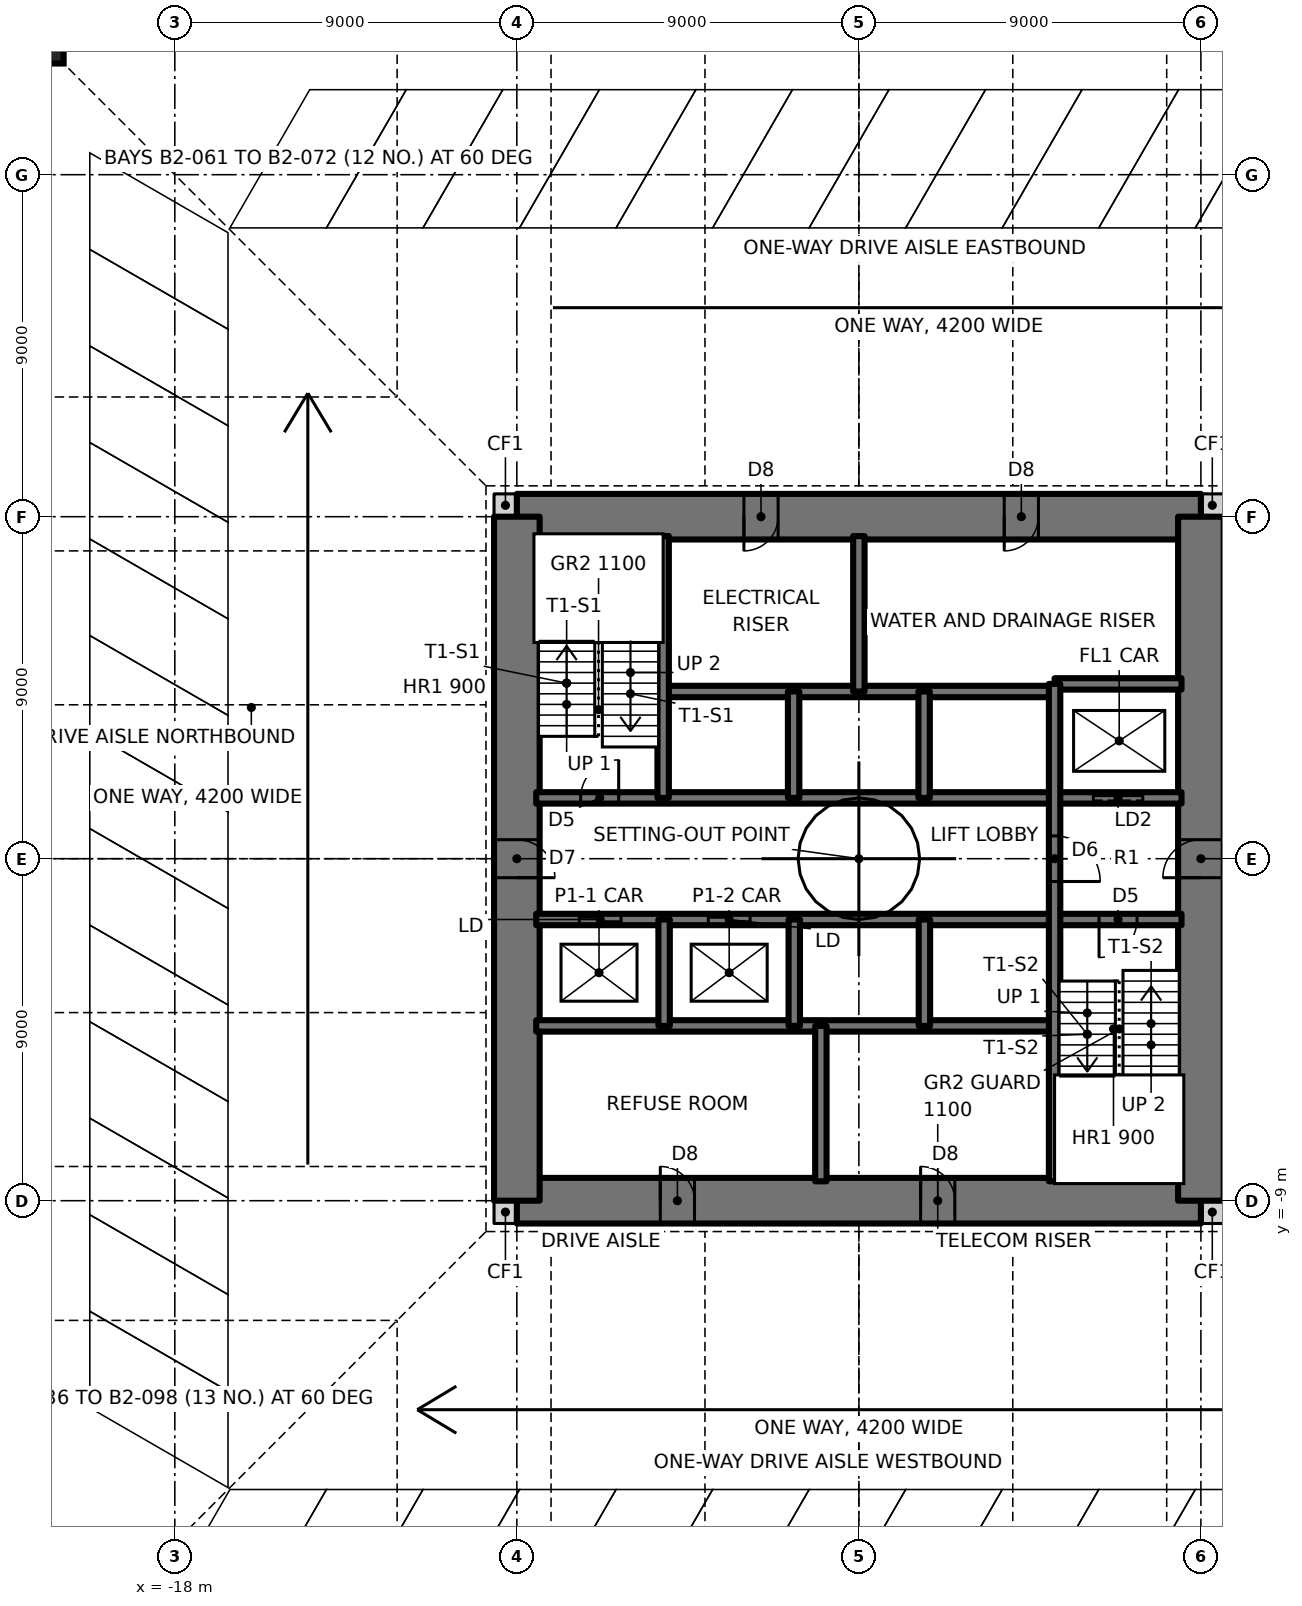
"""IFC4 building model, lengths in metres.
Left out: names, types, materials, properties, quantities, classifications, styles, units other than length and angle.
Written with IfcOpenShell. Run it as: python <this file> out.ifc"""

import sys

from ifc_helpers import new_model, si_unit, direction, frame, frame_2d, origin, origin_2d, place, context, subcontext, project, spatial, rectangle, hollow_rectangle, extrude, element, fill, save


model = new_model("IFC4")
c1 = context("Model", 3, precision=1e-05, world=origin(), true_north=direction((0.0, 1.0)))
c2 = subcontext(c1, "Body", "Model", "MODEL_VIEW")
j1 = project(units=[si_unit("LENGTHUNIT", "METRE"), si_unit("PLANEANGLEUNIT", "RADIAN")], contexts=[c1])
p1 = place(None, origin())
s1 = spatial("IfcSite", under=j1, at=p1, CompositionType="ELEMENT")
p2 = place(p1, origin())
s2 = spatial("IfcBuilding", under=s1, at=p2, CompositionType="ELEMENT")
p3 = place(p2, frame((0.0, 0.0, -7.2)))
s3 = spatial("IfcBuildingStorey", under=s2, at=p3, CompositionType="ELEMENT", Elevation=-7.2)
p4 = place(p3, frame((-21.326, 21.326, -1.8), z_axis=(0.0, 0.0, 1.0), x_axis=(1.0, 0.0, 0.0)))
e1 = element("IfcColumn", 1, at=p4, inside=s3, PredefinedType="COLUMN", context=c2, shape_type="SweptSolid", body=[
    extrude(hollow_rectangle(XDim=0.8, YDim=0.8, WallThickness=0.09, at=origin_2d()), origin(), (0.0, 0.0, 1.0), 5.4),
])
for number, where, z_axis, x_axis in (
    (2, (-9.6, -9.3, -1.8), (0.0, 0.0, 1.0), (1.0, 0.0, 0.0)),
    (3, (9.0, -9.3, -1.8), (0.0, 0.0, 1.0), (1.0, 0.0, 0.0)),
    (4, (9.0, 9.3, -1.8), (0.0, 0.0, 1.0), (1.0, 0.0, 0.0)),
    (5, (-9.6, 9.3, -1.8), (0.0, 0.0, 1.0), (1.0, 0.0, 0.0)),
):
    element("IfcWall", number, at=place(p3, frame(where, z_axis=z_axis, x_axis=x_axis)), inside=s3, PredefinedType="SOLIDWALL", context=c2, shape_type="SweptSolid", body=[
        extrude(rectangle(XDim=0.6, YDim=0.6, at=frame_2d((0.3, 0.0))), origin(), (0.0, 0.0, 1.0), 5.4),
    ])
p5 = place(p3, frame((-9.0, -9.0, -1.8), z_axis=(0.0, 0.0, 1.0), x_axis=(1.0, 0.0, 0.0)))
e6 = element("IfcWall", 6, at=p5, inside=s3, PredefinedType="SHEAR", context=c2, shape_type="SweptSolid", body=[
    extrude(rectangle(XDim=18.0, YDim=1.2, at=frame_2d((9.0, 0.0))), origin(), (0.0, 0.0, 1.0), 5.4),
])
p6 = place(p5, frame((3.775, 0.0, 1.8)))
e7 = element("IfcOpeningElement", 7, at=p6, cuts=e6, PredefinedType="OPENING", context=c2, shape_type="SweptSolid", body=[
    extrude(rectangle(XDim=0.9, YDim=2.1, at=frame_2d((0.45, 1.05))), frame((0.0, 0.61, 0.0), z_axis=(0.0, -1.0, 0.0), x_axis=(1.0, 0.0, 0.0)), (0.0, 0.0, 1.0), 1.22),
])
p7 = place(p5, frame((10.625, 0.0, 1.8)))
e8 = element("IfcOpeningElement", 8, at=p7, cuts=e6, PredefinedType="OPENING", context=c2, shape_type="SweptSolid", body=[
    extrude(rectangle(XDim=0.9, YDim=2.1, at=frame_2d((0.45, 1.05))), frame((0.0, 0.61, 0.0), z_axis=(0.0, -1.0, 0.0), x_axis=(1.0, 0.0, 0.0)), (0.0, 0.0, 1.0), 1.22),
])
p8 = place(p3, frame((9.0, 9.0, -1.8), z_axis=(0.0, 0.0, 1.0), x_axis=(-1.0, 0.0, 0.0)))
e9 = element("IfcWall", 9, at=p8, inside=s3, PredefinedType="SHEAR", context=c2, shape_type="SweptSolid", body=[
    extrude(rectangle(XDim=18.0, YDim=1.2, at=frame_2d((9.0, 0.0))), origin(), (0.0, 0.0, 1.0), 5.4),
])
p9 = place(p8, frame((11.125, 0.0, 1.8)))
e10 = element("IfcOpeningElement", 10, at=p9, cuts=e9, PredefinedType="OPENING", context=c2, shape_type="SweptSolid", body=[
    extrude(rectangle(XDim=0.9, YDim=2.1, at=frame_2d((0.45, 1.05))), frame((0.0, 0.61, 0.0), z_axis=(0.0, -1.0, 0.0), x_axis=(1.0, 0.0, 0.0)), (0.0, 0.0, 1.0), 1.22),
])
p10 = place(p8, frame((4.275, 0.0, 1.8)))
e11 = element("IfcOpeningElement", 11, at=p10, cuts=e9, PredefinedType="OPENING", context=c2, shape_type="SweptSolid", body=[
    extrude(rectangle(XDim=0.9, YDim=2.1, at=frame_2d((0.45, 1.05))), frame((0.0, 0.61, 0.0), z_axis=(0.0, -1.0, 0.0), x_axis=(1.0, 0.0, 0.0)), (0.0, 0.0, 1.0), 1.22),
])
p11 = place(p3, frame((9.0, -9.0, -1.8), z_axis=(0.0, 0.0, 1.0), x_axis=(0.0, 1.0, 0.0)))
e12 = element("IfcWall", 12, at=p11, inside=s3, PredefinedType="SHEAR", context=c2, shape_type="SweptSolid", body=[
    extrude(rectangle(XDim=18.0, YDim=1.2, at=frame_2d((9.0, 0.0))), origin(), (0.0, 0.0, 1.0), 5.4),
])
p12 = place(p11, frame((8.5, 0.0, 1.8)))
e13 = element("IfcOpeningElement", 13, at=p12, cuts=e12, PredefinedType="OPENING", context=c2, shape_type="SweptSolid", body=[
    extrude(rectangle(XDim=1.0, YDim=2.1, at=frame_2d((0.5, 1.05))), frame((0.0, 0.61, 0.0), z_axis=(0.0, -1.0, 0.0), x_axis=(1.0, 0.0, 0.0)), (0.0, 0.0, 1.0), 1.22),
])
p13 = place(p3, frame((-9.0, 9.0, -1.8), z_axis=(0.0, 0.0, 1.0), x_axis=(0.0, -1.0, 0.0)))
e14 = element("IfcWall", 14, at=p13, inside=s3, PredefinedType="SHEAR", context=c2, shape_type="SweptSolid", body=[
    extrude(rectangle(XDim=18.0, YDim=1.2, at=frame_2d((9.0, 0.0))), origin(), (0.0, 0.0, 1.0), 5.4),
])
p14 = place(p13, frame((8.5, 0.0, 1.8)))
e15 = element("IfcOpeningElement", 15, at=p14, cuts=e14, PredefinedType="OPENING", context=c2, shape_type="SweptSolid", body=[
    extrude(rectangle(XDim=1.0, YDim=2.1, at=frame_2d((0.5, 1.05))), frame((0.0, 0.61, 0.0), z_axis=(0.0, -1.0, 0.0), x_axis=(1.0, 0.0, 0.0)), (0.0, 0.0, 1.0), 1.22),
])
for number, where, z_axis, x_axis in (
    (16, (-29.55, -9.0, -1.8), (0.0, 0.0, 1.0), (1.0, 0.0, 0.0)),
    (17, (-29.55, 0.0, -1.8), (0.0, 0.0, 1.0), (1.0, 0.0, 0.0)),
    (18, (-29.55, 9.0, -1.8), (0.0, 0.0, 1.0), (1.0, 0.0, 0.0)),
):
    element("IfcWall", number, at=place(p3, frame(where, z_axis=z_axis, x_axis=x_axis)), inside=s3, PredefinedType="SOLIDWALL", context=c2, shape_type="SweptSolid", body=[
        extrude(rectangle(XDim=19.95, YDim=0.45, at=frame_2d((9.975, 0.0))), origin(), (0.0, 0.0, 1.0), 1.5),
    ])
p15 = place(p3, frame((-29.55, 18.0, -1.8), z_axis=(0.0, 0.0, 1.0), x_axis=(1.0, 0.0, 0.0)))
e19 = element("IfcWall", 19, at=p15, inside=s3, PredefinedType="SOLIDWALL", context=c2, shape_type="SweptSolid", body=[
    extrude(rectangle(XDim=59.1, YDim=0.45, at=frame_2d((29.55, 0.0))), origin(), (0.0, 0.0, 1.0), 1.5),
])
for number, where, z_axis, x_axis in (
    (20, (-18.0, -17.775, -1.8), (0.0, 0.0, 1.0), (0.0, 1.0, 0.0)),
    (21, (-18.0, -8.775, -1.8), (0.0, 0.0, 1.0), (0.0, 1.0, 0.0)),
    (22, (-18.0, 0.225, -1.8), (0.0, 0.0, 1.0), (0.0, 1.0, 0.0)),
    (23, (-18.0, 9.225, -1.8), (0.0, 0.0, 1.0), (0.0, 1.0, 0.0)),
    (24, (-18.0, 18.225, -1.8), (0.0, 0.0, 1.0), (0.0, 1.0, 0.0)),
):
    element("IfcWall", number, at=place(p3, frame(where, z_axis=z_axis, x_axis=x_axis)), inside=s3, PredefinedType="SOLIDWALL", context=c2, shape_type="SweptSolid", body=[
        extrude(rectangle(XDim=8.55, YDim=0.45, at=frame_2d((4.275, 0.0))), origin(), (0.0, 0.0, 1.0), 1.5),
    ])
for number, where, z_axis, x_axis in (
    (25, (-9.0, -17.775, -1.8), (0.0, 0.0, 1.0), (0.0, 1.0, 0.0)),
    (26, (-9.0, 9.6, -1.8), (0.0, 0.0, 1.0), (0.0, 1.0, 0.0)),
):
    element("IfcWall", number, at=place(p3, frame(where, z_axis=z_axis, x_axis=x_axis)), inside=s3, PredefinedType="SOLIDWALL", context=c2, shape_type="SweptSolid", body=[
        extrude(rectangle(XDim=8.175, YDim=0.45, at=frame_2d((4.087, 0.0))), origin(), (0.0, 0.0, 1.0), 1.5),
    ])
p16 = place(p3, frame((-9.0, 18.225, -1.8), z_axis=(0.0, 0.0, 1.0), x_axis=(0.0, 1.0, 0.0)))
e27 = element("IfcWall", 27, at=p16, inside=s3, PredefinedType="SOLIDWALL", context=c2, shape_type="SweptSolid", body=[
    extrude(rectangle(XDim=8.55, YDim=0.45, at=frame_2d((4.275, 0.0))), origin(), (0.0, 0.0, 1.0), 1.5),
])
for number, where, z_axis, x_axis in (
    (28, (0.0, -17.775, -1.8), (0.0, 0.0, 1.0), (0.0, 1.0, 0.0)),
    (29, (0.0, 9.6, -1.8), (0.0, 0.0, 1.0), (0.0, 1.0, 0.0)),
):
    element("IfcWall", number, at=place(p3, frame(where, z_axis=z_axis, x_axis=x_axis)), inside=s3, PredefinedType="SOLIDWALL", context=c2, shape_type="SweptSolid", body=[
        extrude(rectangle(XDim=8.175, YDim=0.45, at=frame_2d((4.087, 0.0))), origin(), (0.0, 0.0, 1.0), 1.5),
    ])
p17 = place(p3, frame((0.0, 18.225, -1.8), z_axis=(0.0, 0.0, 1.0), x_axis=(0.0, 1.0, 0.0)))
e30 = element("IfcWall", 30, at=p17, inside=s3, PredefinedType="SOLIDWALL", context=c2, shape_type="SweptSolid", body=[
    extrude(rectangle(XDim=8.55, YDim=0.45, at=frame_2d((4.275, 0.0))), origin(), (0.0, 0.0, 1.0), 1.5),
])
for number, where, z_axis, x_axis in (
    (31, (9.0, -17.775, -1.8), (0.0, 0.0, 1.0), (0.0, 1.0, 0.0)),
    (32, (9.0, 9.6, -1.8), (0.0, 0.0, 1.0), (0.0, 1.0, 0.0)),
):
    element("IfcWall", number, at=place(p3, frame(where, z_axis=z_axis, x_axis=x_axis)), inside=s3, PredefinedType="SOLIDWALL", context=c2, shape_type="SweptSolid", body=[
        extrude(rectangle(XDim=8.175, YDim=0.45, at=frame_2d((4.087, 0.0))), origin(), (0.0, 0.0, 1.0), 1.5),
    ])
p18 = place(p3, frame((9.0, 18.225, -1.8), z_axis=(0.0, 0.0, 1.0), x_axis=(0.0, 1.0, 0.0)))
e33 = element("IfcWall", 33, at=p18, inside=s3, PredefinedType="SOLIDWALL", context=c2, shape_type="SweptSolid", body=[
    extrude(rectangle(XDim=8.55, YDim=0.45, at=frame_2d((4.275, 0.0))), origin(), (0.0, 0.0, 1.0), 1.5),
])
p19 = place(p3, frame((-8.49, -4.4, -1.8), z_axis=(0.0, 0.0, 1.0), x_axis=(1.0, 0.0, 0.0)))
e34 = element("IfcWall", 34, at=p19, inside=s3, PredefinedType="SOLIDWALL", context=c2, shape_type="SweptSolid", body=[
    extrude(rectangle(XDim=13.64, YDim=0.3, at=frame_2d((6.82, 0.0))), origin(), (0.0, 0.0, 1.0), 5.4),
])
p20 = place(p3, frame((-8.49, -1.6, -1.8), z_axis=(0.0, 0.0, 1.0), x_axis=(1.0, 0.0, 0.0)))
e35 = element("IfcWall", 35, at=p20, inside=s3, PredefinedType="SOLIDWALL", context=c2, shape_type="SweptSolid", body=[
    extrude(rectangle(XDim=16.98, YDim=0.3, at=frame_2d((8.49, 0.0))), origin(), (0.0, 0.0, 1.0), 5.4),
])
p21 = place(p20, frame((14.81, 0.0, 1.8)))
e36 = element("IfcOpeningElement", 36, at=p21, cuts=e35, PredefinedType="OPENING", context=c2, shape_type="SweptSolid", body=[
    extrude(rectangle(XDim=1.0, YDim=2.1, at=frame_2d((0.5, 1.05))), frame((0.0, 0.16, 0.0), z_axis=(0.0, -1.0, 0.0), x_axis=(1.0, 0.0, 0.0)), (0.0, 0.0, 1.0), 0.32),
])
p22 = place(p20, frame((1.133, 0.0, 1.8)))
e37 = element("IfcOpeningElement", 37, at=p22, cuts=e35, PredefinedType="OPENING", context=c2, shape_type="SweptSolid", body=[
    extrude(rectangle(XDim=1.1, YDim=2.1, at=frame_2d((0.55, 1.05))), frame((0.0, 0.16, 0.0), z_axis=(0.0, -1.0, 0.0), x_axis=(1.0, 0.0, 0.0)), (0.0, 0.0, 1.0), 0.32),
])
p23 = place(p20, frame((4.528, 0.0, 1.8)))
e38 = element("IfcOpeningElement", 38, at=p23, cuts=e35, PredefinedType="OPENING", context=c2, shape_type="SweptSolid", body=[
    extrude(rectangle(XDim=1.1, YDim=2.1, at=frame_2d((0.55, 1.05))), frame((0.0, 0.16, 0.0), z_axis=(0.0, -1.0, 0.0), x_axis=(1.0, 0.0, 0.0)), (0.0, 0.0, 1.0), 0.32),
])
p24 = place(p3, frame((-8.49, 1.6, -1.8), z_axis=(0.0, 0.0, 1.0), x_axis=(1.0, 0.0, 0.0)))
e39 = element("IfcWall", 39, at=p24, inside=s3, PredefinedType="SOLIDWALL", context=c2, shape_type="SweptSolid", body=[
    extrude(rectangle(XDim=16.98, YDim=0.3, at=frame_2d((8.49, 0.0))), origin(), (0.0, 0.0, 1.0), 5.4),
])
p25 = place(p24, frame((1.17, 0.0, 1.8)))
e40 = element("IfcOpeningElement", 40, at=p25, cuts=e39, PredefinedType="OPENING", context=c2, shape_type="SweptSolid", body=[
    extrude(rectangle(XDim=1.0, YDim=2.1, at=frame_2d((0.5, 1.05))), frame((0.0, 0.16, 0.0), z_axis=(0.0, -1.0, 0.0), x_axis=(1.0, 0.0, 0.0)), (0.0, 0.0, 1.0), 0.32),
])
p26 = place(p24, frame((14.66, 0.0, 1.8)))
e41 = element("IfcOpeningElement", 41, at=p26, cuts=e39, PredefinedType="OPENING", context=c2, shape_type="SweptSolid", body=[
    extrude(rectangle(XDim=1.3, YDim=2.1, at=frame_2d((0.65, 1.05))), frame((0.0, 0.16, 0.0), z_axis=(0.0, -1.0, 0.0), x_axis=(1.0, 0.0, 0.0)), (0.0, 0.0, 1.0), 0.32),
])
p27 = place(p3, frame((-5.15, 4.4, -1.8), z_axis=(0.0, 0.0, 1.0), x_axis=(1.0, 0.0, 0.0)))
e42 = element("IfcWall", 42, at=p27, inside=s3, PredefinedType="SOLIDWALL", context=c2, shape_type="SweptSolid", body=[
    extrude(rectangle(XDim=10.3, YDim=0.3, at=frame_2d((5.15, 0.0))), origin(), (0.0, 0.0, 1.0), 5.4),
])
p28 = place(p3, frame((5.15, 4.6, -1.8), z_axis=(0.0, 0.0, 1.0), x_axis=(1.0, 0.0, 0.0)))
e43 = element("IfcWall", 43, at=p28, inside=s3, PredefinedType="SOLIDWALL", context=c2, shape_type="SweptSolid", body=[
    extrude(rectangle(XDim=3.34, YDim=0.3, at=frame_2d((1.67, 0.0))), origin(), (0.0, 0.0, 1.0), 5.4),
])
p29 = place(p3, frame((5.15, -8.49, -1.8), z_axis=(0.0, 0.0, 1.0), x_axis=(0.0, 1.0, 0.0)))
e44 = element("IfcWall", 44, at=p29, inside=s3, PredefinedType="SOLIDWALL", context=c2, shape_type="SweptSolid", body=[
    extrude(rectangle(XDim=13.09, YDim=0.3, at=frame_2d((6.545, 0.0))), origin(), (0.0, 0.0, 1.0), 5.4),
])
p30 = place(p29, frame((7.89, 0.0, 1.8)))
e45 = element("IfcOpeningElement", 45, at=p30, cuts=e44, PredefinedType="OPENING", context=c2, shape_type="SweptSolid", body=[
    extrude(rectangle(XDim=1.2, YDim=2.1, at=frame_2d((0.6, 1.05))), frame((0.0, 0.16, 0.0), z_axis=(0.0, -1.0, 0.0), x_axis=(1.0, 0.0, 0.0)), (0.0, 0.0, 1.0), 0.32),
])
for number, where, z_axis, x_axis in (
    (46, (1.725, -4.4, -1.8), (0.0, 0.0, 1.0), (0.0, 1.0, 0.0)),
    (47, (1.717, 1.6, -1.8), (0.0, 0.0, 1.0), (0.0, 1.0, 0.0)),
):
    element("IfcWall", number, at=place(p3, frame(where, z_axis=z_axis, x_axis=x_axis)), inside=s3, PredefinedType="SOLIDWALL", context=c2, shape_type="SweptSolid", body=[
        extrude(rectangle(XDim=2.8, YDim=0.3, at=frame_2d((1.4, 0.0))), origin(), (0.0, 0.0, 1.0), 5.4),
    ])
for number, where, z_axis, x_axis in (
    (48, (0.0, 4.4, -1.8), (0.0, 0.0, 1.0), (0.0, 1.0, 0.0)),
    (49, (-1.0, -8.49, -1.8), (0.0, 0.0, 1.0), (0.0, 1.0, 0.0)),
):
    element("IfcWall", number, at=place(p3, frame(where, z_axis=z_axis, x_axis=x_axis)), inside=s3, PredefinedType="SOLIDWALL", context=c2, shape_type="SweptSolid", body=[
        extrude(rectangle(XDim=4.09, YDim=0.3, at=frame_2d((2.045, 0.0))), origin(), (0.0, 0.0, 1.0), 5.4),
    ])
for number, where, z_axis, x_axis in (
    (50, (-1.7, -4.4, -1.8), (0.0, 0.0, 1.0), (0.0, 1.0, 0.0)),
    (51, (-1.717, 1.6, -1.8), (0.0, 0.0, 1.0), (0.0, 1.0, 0.0)),
    (52, (-5.125, -4.4, -1.8), (0.0, 0.0, 1.0), (0.0, 1.0, 0.0)),
):
    element("IfcWall", number, at=place(p3, frame(where, z_axis=z_axis, x_axis=x_axis)), inside=s3, PredefinedType="SOLIDWALL", context=c2, shape_type="SweptSolid", body=[
        extrude(rectangle(XDim=2.8, YDim=0.3, at=frame_2d((1.4, 0.0))), origin(), (0.0, 0.0, 1.0), 5.4),
    ])
p31 = place(p3, frame((-5.15, 1.6, -1.8), z_axis=(0.0, 0.0, 1.0), x_axis=(0.0, 1.0, 0.0)))
e53 = element("IfcWall", 53, at=p31, inside=s3, PredefinedType="SOLIDWALL", context=c2, shape_type="SweptSolid", body=[
    extrude(rectangle(XDim=6.89, YDim=0.3, at=frame_2d((3.445, 0.0))), origin(), (0.0, 0.0, 1.0), 5.4),
])
p32 = place(p25, origin())
e54 = element("IfcDoor", 54, at=p32, inside=s3, OperationType="SINGLE_SWING_RIGHT", PredefinedType="DOOR", context=c2, shape_type="SweptSolid", body=[
    extrude(rectangle(XDim=1.0, YDim=2.1, at=frame_2d((0.5, 1.05))), frame((0.0, 0.025, 0.0), z_axis=(0.0, -1.0, 0.0), x_axis=(1.0, 0.0, 0.0)), (0.0, 0.0, 1.0), 0.05),
])
fill(e40, e54)
p33 = place(p21, frame((1.0, 0.0, 0.0), z_axis=(0.0, 0.0, 1.0), x_axis=(-1.0, 0.0, 0.0)))
e55 = element("IfcDoor", 55, at=p33, inside=s3, OperationType="SINGLE_SWING_RIGHT", PredefinedType="DOOR", context=c2, shape_type="SweptSolid", body=[
    extrude(rectangle(XDim=1.0, YDim=2.1, at=frame_2d((0.5, 1.05))), frame((0.0, 0.025, 0.0), z_axis=(0.0, -1.0, 0.0), x_axis=(1.0, 0.0, 0.0)), (0.0, 0.0, 1.0), 0.05),
])
fill(e36, e55)
p34 = place(p30, frame((1.2, 0.0, 0.0), z_axis=(0.0, 0.0, 1.0), x_axis=(-1.0, 0.0, 0.0)))
e56 = element("IfcDoor", 56, at=p34, inside=s3, OperationType="SINGLE_SWING_RIGHT", PredefinedType="DOOR", context=c2, shape_type="SweptSolid", body=[
    extrude(rectangle(XDim=1.2, YDim=2.1, at=frame_2d((0.6, 1.05))), frame((0.0, 0.025, 0.0), z_axis=(0.0, -1.0, 0.0), x_axis=(1.0, 0.0, 0.0)), (0.0, 0.0, 1.0), 0.05),
])
fill(e45, e56)
p35 = place(p14, origin())
e57 = element("IfcDoor", 57, at=p35, inside=s3, OperationType="SINGLE_SWING_RIGHT", PredefinedType="DOOR", context=c2, shape_type="SweptSolid", body=[
    extrude(rectangle(XDim=1.0, YDim=2.1, at=frame_2d((0.5, 1.05))), frame((0.0, 0.025, 0.0), z_axis=(0.0, -1.0, 0.0), x_axis=(1.0, 0.0, 0.0)), (0.0, 0.0, 1.0), 0.05),
])
fill(e15, e57)
p36 = place(p12, origin())
e58 = element("IfcDoor", 58, at=p36, inside=s3, OperationType="SINGLE_SWING_LEFT", PredefinedType="DOOR", context=c2, shape_type="SweptSolid", body=[
    extrude(rectangle(XDim=1.0, YDim=2.1, at=frame_2d((0.5, 1.05))), frame((0.0, 0.025, 0.0), z_axis=(0.0, -1.0, 0.0), x_axis=(1.0, 0.0, 0.0)), (0.0, 0.0, 1.0), 0.05),
])
fill(e13, e58)
p37 = place(p9, origin())
e59 = element("IfcDoor", 59, at=p37, inside=s3, OperationType="SINGLE_SWING_RIGHT", PredefinedType="DOOR", context=c2, shape_type="SweptSolid", body=[
    extrude(rectangle(XDim=0.9, YDim=2.1, at=frame_2d((0.45, 1.05))), frame((0.0, 0.025, 0.0), z_axis=(0.0, -1.0, 0.0), x_axis=(1.0, 0.0, 0.0)), (0.0, 0.0, 1.0), 0.05),
])
fill(e10, e59)
p38 = place(p10, origin())
e60 = element("IfcDoor", 60, at=p38, inside=s3, OperationType="SINGLE_SWING_RIGHT", PredefinedType="DOOR", context=c2, shape_type="SweptSolid", body=[
    extrude(rectangle(XDim=0.9, YDim=2.1, at=frame_2d((0.45, 1.05))), frame((0.0, 0.025, 0.0), z_axis=(0.0, -1.0, 0.0), x_axis=(1.0, 0.0, 0.0)), (0.0, 0.0, 1.0), 0.05),
])
fill(e11, e60)
p39 = place(p6, origin())
e61 = element("IfcDoor", 61, at=p39, inside=s3, OperationType="SINGLE_SWING_LEFT", PredefinedType="DOOR", context=c2, shape_type="SweptSolid", body=[
    extrude(rectangle(XDim=0.9, YDim=2.1, at=frame_2d((0.45, 1.05))), frame((0.0, 0.025, 0.0), z_axis=(0.0, -1.0, 0.0), x_axis=(1.0, 0.0, 0.0)), (0.0, 0.0, 1.0), 0.05),
])
fill(e7, e61)
p40 = place(p7, origin())
e62 = element("IfcDoor", 62, at=p40, inside=s3, OperationType="SINGLE_SWING_LEFT", PredefinedType="DOOR", context=c2, shape_type="SweptSolid", body=[
    extrude(rectangle(XDim=0.9, YDim=2.1, at=frame_2d((0.45, 1.05))), frame((0.0, 0.025, 0.0), z_axis=(0.0, -1.0, 0.0), x_axis=(1.0, 0.0, 0.0)), (0.0, 0.0, 1.0), 0.05),
])
fill(e8, e62)
p41 = place(p22, origin())
e63 = element("IfcDoor", 63, at=p41, inside=s3, OperationType="DOUBLE_DOOR_SLIDING", PredefinedType="DOOR", context=c2, shape_type="SweptSolid", body=[
    extrude(rectangle(XDim=1.1, YDim=2.1, at=frame_2d((0.55, 1.05))), frame((0.0, 0.025, 0.0), z_axis=(0.0, -1.0, 0.0), x_axis=(1.0, 0.0, 0.0)), (0.0, 0.0, 1.0), 0.05),
])
fill(e37, e63)
p42 = place(p23, origin())
e64 = element("IfcDoor", 64, at=p42, inside=s3, OperationType="DOUBLE_DOOR_SLIDING", PredefinedType="DOOR", context=c2, shape_type="SweptSolid", body=[
    extrude(rectangle(XDim=1.1, YDim=2.1, at=frame_2d((0.55, 1.05))), frame((0.0, 0.025, 0.0), z_axis=(0.0, -1.0, 0.0), x_axis=(1.0, 0.0, 0.0)), (0.0, 0.0, 1.0), 0.05),
])
fill(e38, e64)
p43 = place(p26, origin())
e65 = element("IfcDoor", 65, at=p43, inside=s3, OperationType="SLIDING_TO_LEFT", PredefinedType="DOOR", context=c2, shape_type="SweptSolid", body=[
    extrude(rectangle(XDim=1.3, YDim=2.1, at=frame_2d((0.65, 1.05))), frame((0.0, 0.025, 0.0), z_axis=(0.0, -1.0, 0.0), x_axis=(1.0, 0.0, 0.0)), (0.0, 0.0, 1.0), 0.05),
])
fill(e41, e65)
save(model, sys.argv[1])
